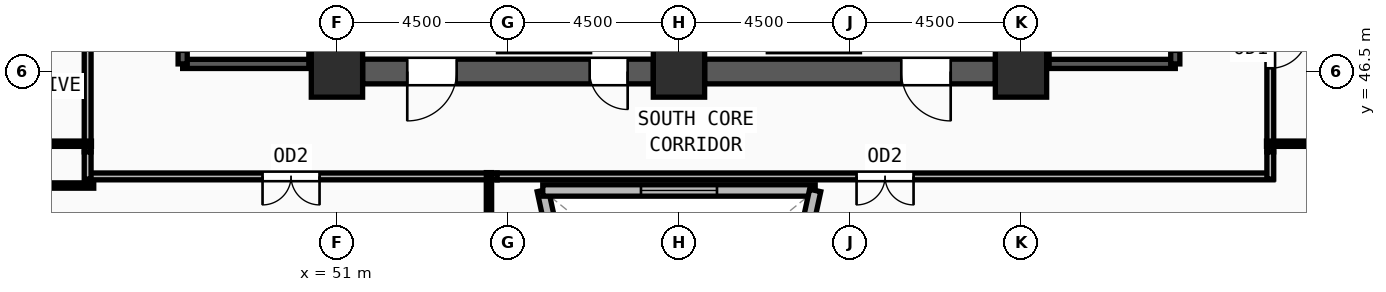
"""IFC4 building model, lengths in metres.
Left out: names, types, materials, properties, quantities, classifications, styles, units other than length and angle.
Written with IfcOpenShell. Run it as: python <this file> out.ifc"""

import sys

from ifc_helpers import new_model, si_unit, direction, frame, frame_2d, origin, origin_2d, place, context, subcontext, project, spatial, rectangle, extrude, source, transform, mapped, element, fill, save


model = new_model("IFC4")
c1 = context("Model", 3, precision=1e-05, world=origin(), true_north=direction((0.0, 1.0)))
c2 = subcontext(c1, "Body", "Model", "MODEL_VIEW")
j1 = project(units=[si_unit("LENGTHUNIT", "METRE"), si_unit("PLANEANGLEUNIT", "RADIAN")], contexts=[c1])
p1 = place(None, origin())
s1 = spatial("IfcSite", under=j1, at=p1, CompositionType="ELEMENT")
p2 = place(p1, origin())
s2 = spatial("IfcBuilding", under=s1, at=p2, CompositionType="ELEMENT")
p3 = place(p2, frame((0.0, 0.0, 270.0)))
s3 = spatial("IfcBuildingStorey", under=s2, at=p3, CompositionType="ELEMENT", Elevation=270.0)
m1 = source(origin(), c2, "Body", "SweptSolid", [
    extrude(rectangle(XDim=1.35, YDim=1.35, at=origin_2d()), origin(), (0.0, 0.0, 1.0), 3.75),
])
for number, where, z_axis, x_axis in (
    (1, (51.0, 46.5, 0.0), (0.0, 0.0, 1.0), (1.0, 0.0, 0.0)),
    (2, (60.0, 46.5, 0.0), (0.0, 0.0, 1.0), (1.0, 0.0, 0.0)),
    (3, (69.0, 46.5, 0.0), (0.0, 0.0, 1.0), (1.0, 0.0, 0.0)),
):
    element("IfcColumn", number, at=place(p3, frame(where, z_axis=z_axis, x_axis=x_axis)), inside=s3, PredefinedType="COLUMN", context=c2, shape_type="MappedRepresentation", body=[
        mapped(m1, transform((0.0, 0.0, 0.0), x_axis=(1.0, 0.0, 0.0), y_axis=(0.0, 1.0, 0.0), z_axis=(0.0, 0.0, 1.0), scale=1.0)),
    ])
p4 = place(p3, frame((39.306, 44.128, 0.0), z_axis=(0.0, 0.0, 1.0), x_axis=(0.555258257402, -0.831677983108, 0.0)))
e4 = element("IfcWall", 4, at=p4, inside=s3, PredefinedType="SOLIDWALL", context=c2, shape_type="SweptSolid", body=[
    extrude(rectangle(XDim=27.454, YDim=0.38, at=frame_2d((13.727, 0.0))), origin(), (0.0, 0.0, 1.0), 3.57),
])
m2 = source(origin(), c2, "Body", "SweptSolid", [
    extrude(rectangle(XDim=1.5, YDim=1.9, at=frame_2d((0.75, 0.95))), frame((0.0, 0.2, 0.0), z_axis=(0.0, -1.0, 0.0), x_axis=(1.0, 0.0, 0.0)), (0.0, 0.0, 1.0), 0.4),
])
p5 = place(p4, frame((6.114, 0.0, 0.55)))
e5 = element("IfcOpeningElement", 5, at=p5, cuts=e4, PredefinedType="OPENING", context=c2, shape_type="MappedRepresentation", body=[
    mapped(m2, transform((0.0, 0.0, 0.0), x_axis=(1.0, 0.0, 0.0), y_axis=(0.0, 1.0, 0.0), z_axis=(0.0, 0.0, 1.0), scale=1.0)),
])
p6 = place(p4, frame((12.977, 0.0, 0.55)))
e6 = element("IfcOpeningElement", 6, at=p6, cuts=e4, PredefinedType="OPENING", context=c2, shape_type="MappedRepresentation", body=[
    mapped(m2, transform((0.0, 0.0, 0.0), x_axis=(1.0, 0.0, 0.0), y_axis=(0.0, 1.0, 0.0), z_axis=(0.0, 0.0, 1.0), scale=1.0)),
])
p7 = place(p4, frame((19.841, 0.0, 0.55)))
e7 = element("IfcOpeningElement", 7, at=p7, cuts=e4, PredefinedType="OPENING", context=c2, shape_type="MappedRepresentation", body=[
    mapped(m2, transform((0.0, 0.0, 0.0), x_axis=(1.0, 0.0, 0.0), y_axis=(0.0, 1.0, 0.0), z_axis=(0.0, 0.0, 1.0), scale=1.0)),
])
p8 = place(p3, frame((68.325, 46.5, 0.0), z_axis=(0.0, 0.0, 1.0), x_axis=(-1.0, 0.0, 0.0)))
e8 = element("IfcWall", 8, at=p8, inside=s3, PredefinedType="SHEAR", context=c2, shape_type="SweptSolid", body=[
    extrude(rectangle(XDim=7.65, YDim=0.65, at=frame_2d((3.825, 0.0))), origin(), (0.0, 0.0, 1.0), 3.57),
])
m3 = source(origin(), c2, "Body", "SweptSolid", [
    extrude(rectangle(XDim=1.3, YDim=2.2, at=frame_2d((0.65, 1.1))), frame((0.0, 0.335, 0.0), z_axis=(0.0, -1.0, 0.0), x_axis=(1.0, 0.0, 0.0)), (0.0, 0.0, 1.0), 0.67),
])
p9 = place(p8, frame((1.175, 0.0, 0.0)))
e9 = element("IfcOpeningElement", 9, at=p9, cuts=e8, PredefinedType="OPENING", context=c2, shape_type="MappedRepresentation", body=[
    mapped(m3, transform((0.0, 0.0, 0.0), x_axis=(1.0, 0.0, 0.0), y_axis=(0.0, 1.0, 0.0), z_axis=(0.0, 0.0, 1.0), scale=1.0)),
])
p10 = place(p3, frame((59.325, 46.5, 0.0), z_axis=(0.0, 0.0, 1.0), x_axis=(-1.0, 0.0, 0.0)))
e10 = element("IfcWall", 10, at=p10, inside=s3, PredefinedType="SHEAR", context=c2, shape_type="SweptSolid", body=[
    extrude(rectangle(XDim=7.65, YDim=0.65, at=frame_2d((3.825, 0.0))), origin(), (0.0, 0.0, 1.0), 3.57),
])
p11 = place(p10, frame((5.175, 0.0, 0.0)))
e11 = element("IfcOpeningElement", 11, at=p11, cuts=e10, PredefinedType="OPENING", context=c2, shape_type="MappedRepresentation", body=[
    mapped(m3, transform((0.0, 0.0, 0.0), x_axis=(1.0, 0.0, 0.0), y_axis=(0.0, 1.0, 0.0), z_axis=(0.0, 0.0, 1.0), scale=1.0)),
])
m4 = source(origin(), c2, "Body", "SweptSolid", [
    extrude(rectangle(XDim=1.0, YDim=2.2, at=frame_2d((0.5, 1.1))), frame((0.0, 0.335, 0.0), z_axis=(0.0, -1.0, 0.0), x_axis=(1.0, 0.0, 0.0)), (0.0, 0.0, 1.0), 0.67),
])
p12 = place(p10, frame((0.675, 0.0, 0.0)))
e12 = element("IfcOpeningElement", 12, at=p12, cuts=e10, PredefinedType="OPENING", context=c2, shape_type="MappedRepresentation", body=[
    mapped(m4, transform((0.0, 0.0, 0.0), x_axis=(1.0, 0.0, 0.0), y_axis=(0.0, 1.0, 0.0), z_axis=(0.0, 0.0, 1.0), scale=1.0)),
])
p13 = place(p3, frame((46.94, 46.7, 0.0), z_axis=(0.0, 0.0, 1.0), x_axis=(1.0, 0.0, 0.0)))
e13 = element("IfcWall", 13, at=p13, inside=s3, PredefinedType="SOLIDWALL", context=c2, shape_type="SweptSolid", body=[
    extrude(rectangle(XDim=3.44, YDim=0.24, at=frame_2d((1.72, 0.0))), origin(), (0.0, 0.0, 1.0), 3.57),
])
p14 = place(p3, frame((50.38, 46.7, 0.0), z_axis=(0.0, 0.0, 1.0), x_axis=(0.0, 1.0, 0.0)))
e14 = element("IfcWall", 14, at=p14, inside=s3, PredefinedType="SOLIDWALL", context=c2, shape_type="SweptSolid", body=[
    extrude(rectangle(XDim=7.82, YDim=0.24, at=frame_2d((3.91, 0.0))), origin(), (0.0, 0.0, 1.0), 3.57),
])
p15 = place(p3, frame((46.94, 54.52, 0.0), z_axis=(0.0, 0.0, 1.0), x_axis=(0.0, -1.0, 0.0)))
e15 = element("IfcWall", 15, at=p15, inside=s3, PredefinedType="SOLIDWALL", context=c2, shape_type="SweptSolid", body=[
    extrude(rectangle(XDim=7.82, YDim=0.24, at=frame_2d((3.91, 0.0))), origin(), (0.0, 0.0, 1.0), 3.57),
])
m5 = source(origin(), c2, "Body", "SweptSolid", [
    extrude(rectangle(XDim=1.2, YDim=2.2, at=frame_2d((0.6, 1.1))), frame((0.0, 0.13, 0.0), z_axis=(0.0, -1.0, 0.0), x_axis=(1.0, 0.0, 0.0)), (0.0, 0.0, 1.0), 0.26),
])
p16 = place(p15, frame((6.3, 0.0, 0.0)))
e16 = element("IfcOpeningElement", 16, at=p16, cuts=e15, PredefinedType="OPENING", context=c2, shape_type="MappedRepresentation", body=[
    mapped(m5, transform((0.0, 0.0, 0.0), x_axis=(1.0, 0.0, 0.0), y_axis=(0.0, 1.0, 0.0), z_axis=(0.0, 0.0, 1.0), scale=1.0)),
])
p17 = place(p3, frame((69.62, 46.7, 0.0), z_axis=(0.0, 0.0, 1.0), x_axis=(1.0, 0.0, 0.0)))
e17 = element("IfcWall", 17, at=p17, inside=s3, PredefinedType="SOLIDWALL", context=c2, shape_type="SweptSolid", body=[
    extrude(rectangle(XDim=3.44, YDim=0.24, at=frame_2d((1.72, 0.0))), origin(), (0.0, 0.0, 1.0), 3.57),
])
p18 = place(p3, frame((73.06, 46.7, 0.0), z_axis=(0.0, 0.0, 1.0), x_axis=(0.0, 1.0, 0.0)))
e18 = element("IfcWall", 18, at=p18, inside=s3, PredefinedType="SOLIDWALL", context=c2, shape_type="SweptSolid", body=[
    extrude(rectangle(XDim=7.82, YDim=0.24, at=frame_2d((3.91, 0.0))), origin(), (0.0, 0.0, 1.0), 3.57),
])
p19 = place(p18, frame((0.32, 0.0, 0.0)))
e19 = element("IfcOpeningElement", 19, at=p19, cuts=e18, PredefinedType="OPENING", context=c2, shape_type="MappedRepresentation", body=[
    mapped(m5, transform((0.0, 0.0, 0.0), x_axis=(1.0, 0.0, 0.0), y_axis=(0.0, 1.0, 0.0), z_axis=(0.0, 0.0, 1.0), scale=1.0)),
])
p20 = place(p3, frame((69.62, 54.52, 0.0), z_axis=(0.0, 0.0, 1.0), x_axis=(0.0, -1.0, 0.0)))
e20 = element("IfcWall", 20, at=p20, inside=s3, PredefinedType="SOLIDWALL", context=c2, shape_type="SweptSolid", body=[
    extrude(rectangle(XDim=7.82, YDim=0.24, at=frame_2d((3.91, 0.0))), origin(), (0.0, 0.0, 1.0), 3.57),
])
p21 = place(p3, frame((57.671, 37.57, 0.0), z_axis=(0.0, 0.0, 1.0), x_axis=(-0.211464510569, 0.977385676573, 0.0)))
e21 = element("IfcWall", 21, at=p21, inside=s3, PredefinedType="SOLIDWALL", context=c2, shape_type="SweptSolid", body=[
    extrude(rectangle(XDim=5.934, YDim=0.3, at=frame_2d((2.967, 0.0))), origin(), (0.0, 0.0, 1.0), 3.57),
])
m6 = source(origin(), c2, "Body", "SweptSolid", [
    extrude(rectangle(XDim=2.0, YDim=1.9, at=frame_2d((1.0, 0.95))), frame((0.0, 0.16, 0.0), z_axis=(0.0, -1.0, 0.0), x_axis=(1.0, 0.0, 0.0)), (0.0, 0.0, 1.0), 0.32),
])
p22 = place(p21, frame((1.967, 0.0, 0.55)))
e22 = element("IfcOpeningElement", 22, at=p22, cuts=e21, PredefinedType="OPENING", context=c2, shape_type="MappedRepresentation", body=[
    mapped(m6, transform((0.0, 0.0, 0.0), x_axis=(1.0, 0.0, 0.0), y_axis=(0.0, 1.0, 0.0), z_axis=(0.0, 0.0, 1.0), scale=1.0)),
])
p23 = place(p3, frame((56.416, 43.37, 0.0), z_axis=(0.0, 0.0, 1.0), x_axis=(1.0, 0.0, 0.0)))
e23 = element("IfcWall", 23, at=p23, inside=s3, PredefinedType="SOLIDWALL", context=c2, shape_type="SweptSolid", body=[
    extrude(rectangle(XDim=7.168, YDim=0.3, at=frame_2d((3.584, 0.0))), origin(), (0.0, 0.0, 1.0), 3.57),
])
p24 = place(p23, frame((2.584, 0.0, 0.55)))
e24 = element("IfcOpeningElement", 24, at=p24, cuts=e23, PredefinedType="OPENING", context=c2, shape_type="MappedRepresentation", body=[
    mapped(m6, transform((0.0, 0.0, 0.0), x_axis=(1.0, 0.0, 0.0), y_axis=(0.0, 1.0, 0.0), z_axis=(0.0, 0.0, 1.0), scale=1.0)),
])
p25 = place(p3, frame((63.584, 43.37, 0.0), z_axis=(0.0, 0.0, 1.0), x_axis=(-0.211464510569, -0.977385676573, 0.0)))
e25 = element("IfcWall", 25, at=p25, inside=s3, PredefinedType="SOLIDWALL", context=c2, shape_type="SweptSolid", body=[
    extrude(rectangle(XDim=5.934, YDim=0.3, at=frame_2d((2.967, 0.0))), origin(), (0.0, 0.0, 1.0), 3.57),
])
p26 = place(p25, frame((1.967, 0.0, 0.55)))
e26 = element("IfcOpeningElement", 26, at=p26, cuts=e25, PredefinedType="OPENING", context=c2, shape_type="MappedRepresentation", body=[
    mapped(m6, transform((0.0, 0.0, 0.0), x_axis=(1.0, 0.0, 0.0), y_axis=(0.0, 1.0, 0.0), z_axis=(0.0, 0.0, 1.0), scale=1.0)),
])
p27 = place(p3, frame((55.215, 43.74, 0.0), z_axis=(0.0, 0.0, 1.0), x_axis=(-1.0, 0.0, 0.0)))
e27 = element("IfcWall", 27, at=p27, inside=s3, PredefinedType="PARTITIONING", context=c2, shape_type="SweptSolid", body=[
    extrude(rectangle(XDim=10.845, YDim=0.18, at=frame_2d((5.422, 0.0))), origin(), (0.0, 0.0, 1.0), 3.57),
])
m7 = source(origin(), c2, "Body", "SweptSolid", [
    extrude(rectangle(XDim=1.5, YDim=2.2, at=frame_2d((0.75, 1.1))), frame((0.0, 0.1, 0.0), z_axis=(0.0, -1.0, 0.0), x_axis=(1.0, 0.0, 0.0)), (0.0, 0.0, 1.0), 0.2),
])
p28 = place(p27, frame((4.673, 0.0, 0.0)))
e28 = element("IfcOpeningElement", 28, at=p28, cuts=e27, PredefinedType="OPENING", context=c2, shape_type="MappedRepresentation", body=[
    mapped(m7, transform((0.0, 0.0, 0.0), x_axis=(1.0, 0.0, 0.0), y_axis=(0.0, 1.0, 0.0), z_axis=(0.0, 0.0, 1.0), scale=1.0)),
])
p29 = place(p3, frame((75.63, 43.74, 0.0), z_axis=(0.0, 0.0, 1.0), x_axis=(-1.0, 0.0, 0.0)))
e29 = element("IfcWall", 29, at=p29, inside=s3, PredefinedType="PARTITIONING", context=c2, shape_type="SweptSolid", body=[
    extrude(rectangle(XDim=20.415, YDim=0.18, at=frame_2d((10.208, 0.0))), origin(), (0.0, 0.0, 1.0), 3.57),
])
p30 = place(p29, frame((9.457, 0.0, 0.0)))
e30 = element("IfcOpeningElement", 30, at=p30, cuts=e29, PredefinedType="OPENING", context=c2, shape_type="MappedRepresentation", body=[
    mapped(m7, transform((0.0, 0.0, 0.0), x_axis=(1.0, 0.0, 0.0), y_axis=(0.0, 1.0, 0.0), z_axis=(0.0, 0.0, 1.0), scale=1.0)),
])
p31 = place(p3, frame((75.56, 49.785, 0.0), z_axis=(0.0, 0.0, 1.0), x_axis=(0.0, -1.0, 0.0)))
e31 = element("IfcWall", 31, at=p31, inside=s3, PredefinedType="PARTITIONING", context=c2, shape_type="SweptSolid", body=[
    extrude(rectangle(XDim=5.4, YDim=0.18, at=frame_2d((2.7, 0.0))), origin(), (0.0, 0.0, 1.0), 3.57),
])
m8 = source(origin(), c2, "Body", "SweptSolid", [
    extrude(rectangle(XDim=1.0, YDim=2.2, at=frame_2d((0.5, 1.1))), frame((0.0, 0.1, 0.0), z_axis=(0.0, -1.0, 0.0), x_axis=(1.0, 0.0, 0.0)), (0.0, 0.0, 1.0), 0.2),
])
p32 = place(p31, frame((2.2, 0.0, 0.0)))
e32 = element("IfcOpeningElement", 32, at=p32, cuts=e31, PredefinedType="OPENING", context=c2, shape_type="MappedRepresentation", body=[
    mapped(m8, transform((0.0, 0.0, 0.0), x_axis=(1.0, 0.0, 0.0), y_axis=(0.0, 1.0, 0.0), z_axis=(0.0, 0.0, 1.0), scale=1.0)),
])
p33 = place(p3, frame((44.44, 44.385, 0.0), z_axis=(0.0, 0.0, 1.0), x_axis=(0.0, 1.0, 0.0)))
e33 = element("IfcWall", 33, at=p33, inside=s3, PredefinedType="PARTITIONING", context=c2, shape_type="SweptSolid", body=[
    extrude(rectangle(XDim=3.825, YDim=0.18, at=frame_2d((1.913, 0.0))), origin(), (0.0, 0.0, 1.0), 3.57),
])
for number, where, z_axis, x_axis in (
    (34, (44.44, 43.67, 0.0), (0.0, 0.0, 1.0), (0.0, 1.0, 0.0)),
    (35, (75.56, 44.385, 0.0), (0.0, 0.0, 1.0), (0.0, -1.0, 0.0)),
):
    element("IfcWall", number, at=place(p3, frame(where, z_axis=z_axis, x_axis=x_axis)), inside=s3, PredefinedType="PARTITIONING", context=c2, shape_type="SweptSolid", body=[
        extrude(rectangle(XDim=0.715, YDim=0.18, at=frame_2d((0.357, 0.0))), origin(), (0.0, 0.0, 1.0), 3.57),
    ])
p34 = place(p3, frame((44.6, 43.5, 0.0), z_axis=(0.0, 0.0, 1.0), x_axis=(-1.0, 0.0, 0.0)))
e36 = element("IfcWall", 36, at=p34, inside=s3, PredefinedType="PARTITIONING", context=c2, shape_type="SweptSolid", body=[
    extrude(rectangle(XDim=5.633, YDim=0.14, at=frame_2d((2.816, 0.0))), origin(), (0.0, 0.0, 1.0), 3.57),
])
p35 = place(p3, frame((44.54, 44.6, 0.0), z_axis=(0.0, 0.0, 1.0), x_axis=(-1.0, 0.0, 0.0)))
e37 = element("IfcWall", 37, at=p35, inside=s3, PredefinedType="PARTITIONING", context=c2, shape_type="SweptSolid", body=[
    extrude(rectangle(XDim=6.256, YDim=0.14, at=frame_2d((3.128, 0.0))), origin(), (0.0, 0.0, 1.0), 3.57),
])
p36 = place(p3, frame((75.46, 44.6, 0.0), z_axis=(0.0, 0.0, 1.0), x_axis=(1.0, 0.0, 0.0)))
e38 = element("IfcWall", 38, at=p36, inside=s3, PredefinedType="PARTITIONING", context=c2, shape_type="SweptSolid", body=[
    extrude(rectangle(XDim=5.91, YDim=0.14, at=frame_2d((2.955, 0.0))), origin(), (0.0, 0.0, 1.0), 3.57),
])
p37 = place(p3, frame((55.0, 43.84, 0.0), z_axis=(0.0, 0.0, 1.0), x_axis=(0.0, -1.0, 0.0)))
e39 = element("IfcWall", 39, at=p37, inside=s3, PredefinedType="PARTITIONING", context=c2, shape_type="SweptSolid", body=[
    extrude(rectangle(XDim=23.679, YDim=0.14, at=frame_2d((11.84, 0.0))), origin(), (0.0, 0.0, 1.0), 2.855),
])
m9 = source(origin(), c2, "Body", "SweptSolid", [
    extrude(rectangle(XDim=1.3, YDim=2.2, at=frame_2d((0.65, 1.1))), frame((0.0, 0.025, 0.0), z_axis=(0.0, -1.0, 0.0), x_axis=(1.0, 0.0, 0.0)), (0.0, 0.0, 1.0), 0.05),
])
p38 = place(p11, origin())
e40 = element("IfcDoor", 40, at=p38, inside=s3, OperationType="SINGLE_SWING_RIGHT", PredefinedType="DOOR", context=c2, shape_type="MappedRepresentation", body=[
    mapped(m9, transform((0.0, 0.0, 0.0), x_axis=(1.0, 0.0, 0.0), y_axis=(0.0, 1.0, 0.0), z_axis=(0.0, 0.0, 1.0), scale=1.0)),
])
fill(e11, e40)
m10 = source(origin(), c2, "Body", "SweptSolid", [
    extrude(rectangle(XDim=1.0, YDim=2.2, at=frame_2d((0.5, 1.1))), frame((0.0, 0.025, 0.0), z_axis=(0.0, -1.0, 0.0), x_axis=(1.0, 0.0, 0.0)), (0.0, 0.0, 1.0), 0.05),
])
p39 = place(p12, origin())
e41 = element("IfcDoor", 41, at=p39, inside=s3, OperationType="SINGLE_SWING_LEFT", PredefinedType="DOOR", context=c2, shape_type="MappedRepresentation", body=[
    mapped(m10, transform((0.0, 0.0, 0.0), x_axis=(1.0, 0.0, 0.0), y_axis=(0.0, 1.0, 0.0), z_axis=(0.0, 0.0, 1.0), scale=1.0)),
])
fill(e12, e41)
p40 = place(p9, origin())
e42 = element("IfcDoor", 42, at=p40, inside=s3, OperationType="SINGLE_SWING_LEFT", PredefinedType="DOOR", context=c2, shape_type="MappedRepresentation", body=[
    mapped(m9, transform((0.0, 0.0, 0.0), x_axis=(1.0, 0.0, 0.0), y_axis=(0.0, 1.0, 0.0), z_axis=(0.0, 0.0, 1.0), scale=1.0)),
])
fill(e9, e42)
m11 = source(origin(), c2, "Body", "SweptSolid", [
    extrude(rectangle(XDim=2.0, YDim=1.9, at=frame_2d((1.0, 0.95))), frame((0.0, 0.03, 0.0), z_axis=(0.0, -1.0, 0.0), x_axis=(1.0, 0.0, 0.0)), (0.0, 0.0, 1.0), 0.06),
])
p41 = place(p24, origin())
e43 = element("IfcWindow", 43, at=p41, inside=s3, PartitioningType="DOUBLE_PANEL_VERTICAL", PredefinedType="WINDOW", context=c2, shape_type="MappedRepresentation", body=[
    mapped(m11, transform((0.0, 0.0, 0.0), x_axis=(1.0, 0.0, 0.0), y_axis=(0.0, 1.0, 0.0), z_axis=(0.0, 0.0, 1.0), scale=1.0)),
])
fill(e24, e43)
m12 = source(origin(), c2, "Body", "SweptSolid", [
    extrude(rectangle(XDim=1.5, YDim=2.2, at=frame_2d((0.75, 1.1))), frame((0.0, 0.025, 0.0), z_axis=(0.0, -1.0, 0.0), x_axis=(1.0, 0.0, 0.0)), (0.0, 0.0, 1.0), 0.05),
])
p42 = place(p28, origin())
e44 = element("IfcDoor", 44, at=p42, inside=s3, OperationType="DOUBLE_DOOR_SINGLE_SWING", PredefinedType="DOOR", context=c2, shape_type="MappedRepresentation", body=[
    mapped(m12, transform((0.0, 0.0, 0.0), x_axis=(1.0, 0.0, 0.0), y_axis=(0.0, 1.0, 0.0), z_axis=(0.0, 0.0, 1.0), scale=1.0)),
])
fill(e28, e44)
p43 = place(p30, origin())
e45 = element("IfcDoor", 45, at=p43, inside=s3, OperationType="DOUBLE_DOOR_SINGLE_SWING", PredefinedType="DOOR", context=c2, shape_type="MappedRepresentation", body=[
    mapped(m12, transform((0.0, 0.0, 0.0), x_axis=(1.0, 0.0, 0.0), y_axis=(0.0, 1.0, 0.0), z_axis=(0.0, 0.0, 1.0), scale=1.0)),
])
fill(e30, e45)
p44 = place(p32, origin())
e46 = element("IfcDoor", 46, at=p44, inside=s3, OperationType="SINGLE_SWING_LEFT", PredefinedType="DOOR", context=c2, shape_type="MappedRepresentation", body=[
    mapped(m10, transform((0.0, 0.0, 0.0), x_axis=(1.0, 0.0, 0.0), y_axis=(0.0, 1.0, 0.0), z_axis=(0.0, 0.0, 1.0), scale=1.0)),
])
fill(e32, e46)
save(model, sys.argv[1])
